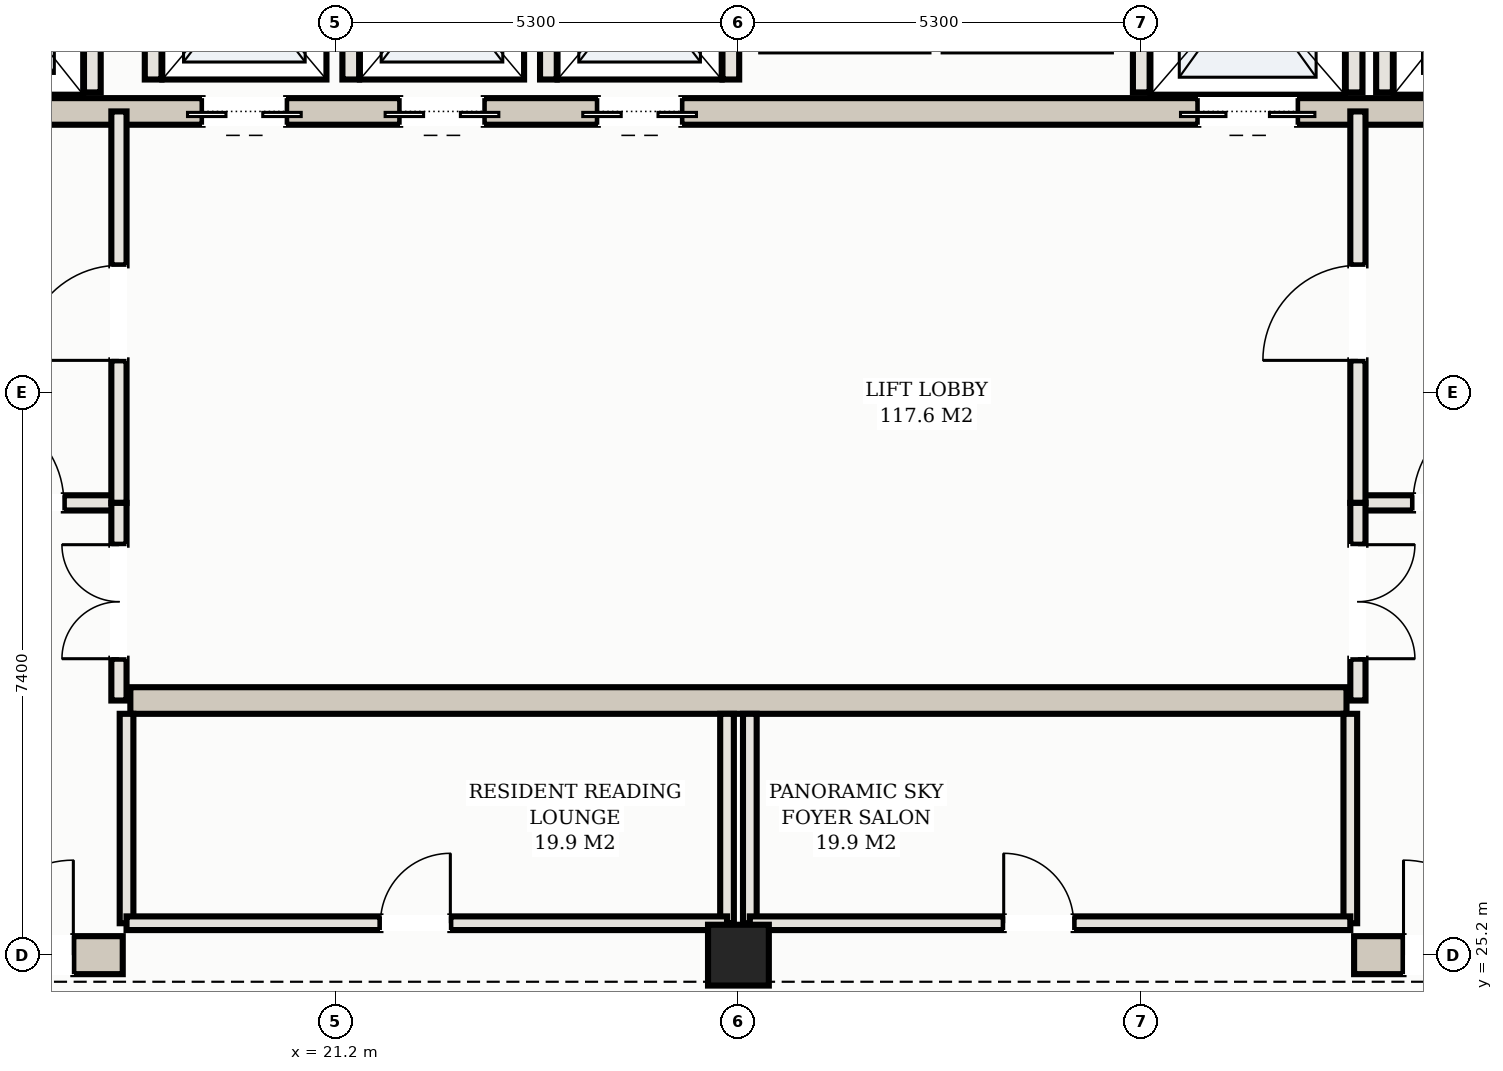
"""IFC4 building model, lengths in metres.
Left out: names, types, materials, properties, quantities, classifications, styles, units other than length and angle.
Written with IfcOpenShell. Run it as: python <this file> out.ifc"""

import sys

from ifc_helpers import new_model, si_unit, direction, frame, frame_2d, origin, origin_2d, place, context, subcontext, project, spatial, rectangle, hollow_rectangle, extrude, element, fill, save


model = new_model("IFC4")
c1 = context("Model", 3, precision=1e-05, world=origin(), true_north=direction((0.0, 1.0)))
c2 = subcontext(c1, "Body", "Model", "MODEL_VIEW")
j1 = project(units=[si_unit("LENGTHUNIT", "METRE"), si_unit("PLANEANGLEUNIT", "RADIAN")], contexts=[c1])
p1 = place(None, origin())
s1 = spatial("IfcSite", under=j1, at=p1, CompositionType="ELEMENT")
p2 = place(p1, origin())
s2 = spatial("IfcBuilding", under=s1, at=p2, CompositionType="ELEMENT")
p3 = place(p2, frame((0.0, 0.0, 206.6)))
s3 = spatial("IfcBuildingStorey", under=s2, at=p3, CompositionType="ELEMENT", Elevation=206.6)
p4 = place(p3, frame((10.35, 25.2, 0.0), z_axis=(0.0, 0.0, 1.0), x_axis=(1.0, 0.0, 0.0)))
e1 = element("IfcWall", 1, at=p4, inside=s3, PredefinedType="SHEAR", context=c2, shape_type="SweptSolid", body=[
    extrude(rectangle(XDim=8.05, YDim=0.5, at=frame_2d((4.025, 0.0))), origin(), (0.0, 0.0, 1.0), 3.11),
])
p5 = place(p4, frame((6.15, 0.0, 0.0)))
e2 = element("IfcOpeningElement", 2, at=p5, cuts=e1, PredefinedType="OPENING", context=c2, shape_type="SweptSolid", body=[
    extrude(rectangle(XDim=1.25, YDim=2.2, at=frame_2d((0.625, 1.1))), frame((0.0, 0.26, 0.0), z_axis=(0.0, -1.0, 0.0), x_axis=(1.0, 0.0, 0.0)), (0.0, 0.0, 1.0), 0.52),
])
p6 = place(p3, frame((34.6, 25.2, 0.0), z_axis=(0.0, 0.0, 1.0), x_axis=(1.0, 0.0, 0.0)))
e3 = element("IfcWall", 3, at=p6, inside=s3, PredefinedType="SHEAR", context=c2, shape_type="SweptSolid", body=[
    extrude(rectangle(XDim=8.05, YDim=0.5, at=frame_2d((4.025, 0.0))), origin(), (0.0, 0.0, 1.0), 3.11),
])
p7 = place(p6, frame((0.65, 0.0, 0.0)))
e4 = element("IfcOpeningElement", 4, at=p7, cuts=e3, PredefinedType="OPENING", context=c2, shape_type="SweptSolid", body=[
    extrude(rectangle(XDim=1.25, YDim=2.2, at=frame_2d((0.625, 1.1))), frame((0.0, 0.26, 0.0), z_axis=(0.0, -1.0, 0.0), x_axis=(1.0, 0.0, 0.0)), (0.0, 0.0, 1.0), 0.52),
])
p8 = place(p3, frame((15.5, 36.3, 0.0), z_axis=(0.0, 0.0, 1.0), x_axis=(1.0, 0.0, 0.0)))
e5 = element("IfcWall", 5, at=p8, inside=s3, PredefinedType="SHEAR", context=c2, shape_type="SweptSolid", body=[
    extrude(rectangle(XDim=22.0, YDim=0.35, at=frame_2d((11.0, 0.0))), origin(), (0.0, 0.0, 1.0), 3.11),
])
p9 = place(p8, frame((0.65, 0.0, 0.0)))
e6 = element("IfcOpeningElement", 6, at=p9, cuts=e5, PredefinedType="OPENING", context=c2, shape_type="SweptSolid", body=[
    extrude(rectangle(XDim=1.1, YDim=2.15, at=frame_2d((0.55, 1.075))), frame((0.0, 0.185, 0.0), z_axis=(0.0, -1.0, 0.0), x_axis=(1.0, 0.0, 0.0)), (0.0, 0.0, 1.0), 0.37),
])
p10 = place(p8, frame((20.25, 0.0, 0.0)))
e7 = element("IfcOpeningElement", 7, at=p10, cuts=e5, PredefinedType="OPENING", context=c2, shape_type="SweptSolid", body=[
    extrude(rectangle(XDim=1.1, YDim=2.15, at=frame_2d((0.55, 1.075))), frame((0.0, 0.185, 0.0), z_axis=(0.0, -1.0, 0.0), x_axis=(1.0, 0.0, 0.0)), (0.0, 0.0, 1.0), 0.37),
])
p11 = place(p8, frame((17.05, 0.0, 0.0)))
e8 = element("IfcOpeningElement", 8, at=p11, cuts=e5, PredefinedType="OPENING", context=c2, shape_type="SweptSolid", body=[
    extrude(rectangle(XDim=1.3, YDim=2.2, at=frame_2d((0.65, 1.1))), frame((0.0, 0.185, 0.0), z_axis=(0.0, -1.0, 0.0), x_axis=(1.0, 0.0, 0.0)), (0.0, 0.0, 1.0), 0.37),
])
p12 = place(p8, frame((3.95, 0.0, 0.0)))
e9 = element("IfcOpeningElement", 9, at=p12, cuts=e5, PredefinedType="OPENING", context=c2, shape_type="SweptSolid", body=[
    extrude(rectangle(XDim=1.1, YDim=2.15, at=frame_2d((0.55, 1.075))), frame((0.0, 0.185, 0.0), z_axis=(0.0, -1.0, 0.0), x_axis=(1.0, 0.0, 0.0)), (0.0, 0.0, 1.0), 0.37),
])
p13 = place(p8, frame((6.55, 0.0, 0.0)))
e10 = element("IfcOpeningElement", 10, at=p13, cuts=e5, PredefinedType="OPENING", context=c2, shape_type="SweptSolid", body=[
    extrude(rectangle(XDim=1.1, YDim=2.15, at=frame_2d((0.55, 1.075))), frame((0.0, 0.185, 0.0), z_axis=(0.0, -1.0, 0.0), x_axis=(1.0, 0.0, 0.0)), (0.0, 0.0, 1.0), 0.37),
])
p14 = place(p8, frame((9.15, 0.0, 0.0)))
e11 = element("IfcOpeningElement", 11, at=p14, cuts=e5, PredefinedType="OPENING", context=c2, shape_type="SweptSolid", body=[
    extrude(rectangle(XDim=1.1, YDim=2.15, at=frame_2d((0.55, 1.075))), frame((0.0, 0.185, 0.0), z_axis=(0.0, -1.0, 0.0), x_axis=(1.0, 0.0, 0.0)), (0.0, 0.0, 1.0), 0.37),
])
p15 = place(p3, frame((18.5, 28.55, 0.0), z_axis=(0.0, 0.0, 1.0), x_axis=(1.0, 0.0, 0.0)))
e12 = element("IfcWall", 12, at=p15, inside=s3, PredefinedType="SHEAR", context=c2, shape_type="SweptSolid", body=[
    extrude(rectangle(XDim=16.0, YDim=0.35, at=frame_2d((8.0, 0.0))), origin(), (0.0, 0.0, 1.0), 3.11),
])
p16 = place(p3, frame((26.5, 25.2, 0.0), z_axis=(0.0, 0.0, 1.0), x_axis=(1.0, 0.0, 0.0)))
e13 = element("IfcColumn", 13, at=p16, inside=s3, PredefinedType="COLUMN", context=c2, shape_type="SweptSolid", body=[
    extrude(hollow_rectangle(XDim=0.8, YDim=0.8, WallThickness=0.028, at=origin_2d()), origin(), (0.0, 0.0, 1.0), 3.3),
])
for number, where, z_axis, x_axis in (
    (14, (18.0, 36.55, 0.0), (0.0, 0.0, 1.0), (0.0, 1.0, 0.0)),
    (15, (35.0, 36.55, 0.0), (0.0, 0.0, 1.0), (0.0, 1.0, 0.0)),
    (16, (31.8, 36.55, 0.0), (0.0, 0.0, 1.0), (0.0, 1.0, 0.0)),
    (17, (34.6, 36.55, 0.0), (0.0, 0.0, 1.0), (0.0, 1.0, 0.0)),
):
    element("IfcWall", number, at=place(p3, frame(where, z_axis=z_axis, x_axis=x_axis)), inside=s3, PredefinedType="SOLIDWALL", context=c2, shape_type="SweptSolid", body=[
        extrude(rectangle(XDim=2.93, YDim=0.22, at=frame_2d((1.465, 0.0))), origin(), (0.0, 0.0, 1.0), 3.11),
    ])
for number, where, z_axis, x_axis in (
    (18, (18.8, 36.72, 0.0), (0.0, 0.0, 1.0), (0.0, 1.0, 0.0)),
    (19, (21.4, 36.72, 0.0), (0.0, 0.0, 1.0), (0.0, 1.0, 0.0)),
    (20, (24.0, 36.72, 0.0), (0.0, 0.0, 1.0), (0.0, 1.0, 0.0)),
    (21, (26.4, 36.72, 0.0), (0.0, 0.0, 1.0), (0.0, 1.0, 0.0)),
):
    element("IfcWall", number, at=place(p3, frame(where, z_axis=z_axis, x_axis=x_axis)), inside=s3, PredefinedType="SOLIDWALL", context=c2, shape_type="SweptSolid", body=[
        extrude(rectangle(XDim=2.56, YDim=0.22, at=frame_2d((1.28, 0.0))), origin(), (0.0, 0.0, 1.0), 3.11),
    ])
p17 = place(p3, frame((15.1, 31.15, 0.0), z_axis=(0.0, 0.0, 1.0), x_axis=(1.0, 0.0, 0.0)))
e22 = element("IfcWall", 22, at=p17, inside=s3, PredefinedType="PARTITIONING", context=c2, shape_type="SweptSolid", body=[
    extrude(rectangle(XDim=3.25, YDim=0.2, at=frame_2d((1.625, 0.0))), origin(), (0.0, 0.0, 1.0), 2.43),
])
p18 = place(p17, frame((1.275, 0.0, 0.0)))
e23 = element("IfcOpeningElement", 23, at=p18, cuts=e22, PredefinedType="OPENING", context=c2, shape_type="SweptSolid", body=[
    extrude(rectangle(XDim=1.25, YDim=2.2, at=frame_2d((0.625, 1.1))), frame((0.0, 0.11, 0.0), z_axis=(0.0, -1.0, 0.0), x_axis=(1.0, 0.0, 0.0)), (0.0, 0.0, 1.0), 0.22),
])
p19 = place(p3, frame((18.35, 31.15, 0.0), z_axis=(0.0, 0.0, 1.0), x_axis=(0.0, 1.0, 0.0)))
e24 = element("IfcWall", 24, at=p19, inside=s3, PredefinedType="PARTITIONING", context=c2, shape_type="SweptSolid", body=[
    extrude(rectangle(XDim=5.15, YDim=0.2, at=frame_2d((2.575, 0.0))), origin(), (0.0, 0.0, 1.0), 2.43),
])
p20 = place(p19, frame((1.875, 0.0, 0.0)))
e25 = element("IfcOpeningElement", 25, at=p20, cuts=e24, PredefinedType="OPENING", context=c2, shape_type="SweptSolid", body=[
    extrude(rectangle(XDim=1.25, YDim=2.2, at=frame_2d((0.625, 1.1))), frame((0.0, 0.11, 0.0), z_axis=(0.0, -1.0, 0.0), x_axis=(1.0, 0.0, 0.0)), (0.0, 0.0, 1.0), 0.22),
])
p21 = place(p3, frame((34.65, 31.15, 0.0), z_axis=(0.0, 0.0, 1.0), x_axis=(1.0, 0.0, 0.0)))
e26 = element("IfcWall", 26, at=p21, inside=s3, PredefinedType="PARTITIONING", context=c2, shape_type="SweptSolid", body=[
    extrude(rectangle(XDim=3.25, YDim=0.2, at=frame_2d((1.625, 0.0))), origin(), (0.0, 0.0, 1.0), 2.43),
])
p22 = place(p21, frame((0.725, 0.0, 0.0)))
e27 = element("IfcOpeningElement", 27, at=p22, cuts=e26, PredefinedType="OPENING", context=c2, shape_type="SweptSolid", body=[
    extrude(rectangle(XDim=1.25, YDim=2.2, at=frame_2d((0.625, 1.1))), frame((0.0, 0.11, 0.0), z_axis=(0.0, -1.0, 0.0), x_axis=(1.0, 0.0, 0.0)), (0.0, 0.0, 1.0), 0.22),
])
p23 = place(p3, frame((34.65, 31.15, 0.0), z_axis=(0.0, 0.0, 1.0), x_axis=(0.0, 1.0, 0.0)))
e28 = element("IfcWall", 28, at=p23, inside=s3, PredefinedType="PARTITIONING", context=c2, shape_type="SweptSolid", body=[
    extrude(rectangle(XDim=5.15, YDim=0.2, at=frame_2d((2.575, 0.0))), origin(), (0.0, 0.0, 1.0), 2.43),
])
p24 = place(p23, frame((1.875, 0.0, 0.0)))
e29 = element("IfcOpeningElement", 29, at=p24, cuts=e28, PredefinedType="OPENING", context=c2, shape_type="SweptSolid", body=[
    extrude(rectangle(XDim=1.25, YDim=2.2, at=frame_2d((0.625, 1.1))), frame((0.0, 0.11, 0.0), z_axis=(0.0, -1.0, 0.0), x_axis=(1.0, 0.0, 0.0)), (0.0, 0.0, 1.0), 0.22),
])
p25 = place(p3, frame((18.35, 28.55, 0.0), z_axis=(0.0, 0.0, 1.0), x_axis=(0.0, 1.0, 0.0)))
e30 = element("IfcWall", 30, at=p25, inside=s3, PredefinedType="PARTITIONING", context=c2, shape_type="SweptSolid", body=[
    extrude(rectangle(XDim=2.6, YDim=0.2, at=frame_2d((1.3, 0.0))), origin(), (0.0, 0.0, 1.0), 2.43),
])
p26 = place(p25, frame((0.55, 0.0, 0.0)))
e31 = element("IfcOpeningElement", 31, at=p26, cuts=e30, PredefinedType="OPENING", context=c2, shape_type="SweptSolid", body=[
    extrude(rectangle(XDim=1.5, YDim=2.25, at=frame_2d((0.75, 1.125))), frame((0.0, 0.11, 0.0), z_axis=(0.0, -1.0, 0.0), x_axis=(1.0, 0.0, 0.0)), (0.0, 0.0, 1.0), 0.22),
])
p27 = place(p3, frame((34.65, 28.55, 0.0), z_axis=(0.0, 0.0, 1.0), x_axis=(0.0, 1.0, 0.0)))
e32 = element("IfcWall", 32, at=p27, inside=s3, PredefinedType="PARTITIONING", context=c2, shape_type="SweptSolid", body=[
    extrude(rectangle(XDim=2.6, YDim=0.2, at=frame_2d((1.3, 0.0))), origin(), (0.0, 0.0, 1.0), 2.43),
])
p28 = place(p27, frame((0.55, 0.0, 0.0)))
e33 = element("IfcOpeningElement", 33, at=p28, cuts=e32, PredefinedType="OPENING", context=c2, shape_type="SweptSolid", body=[
    extrude(rectangle(XDim=1.5, YDim=2.25, at=frame_2d((0.75, 1.125))), frame((0.0, 0.11, 0.0), z_axis=(0.0, -1.0, 0.0), x_axis=(1.0, 0.0, 0.0)), (0.0, 0.0, 1.0), 0.22),
])
for number, where, z_axis, x_axis in (
    (34, (18.45, 25.62, 0.0), (0.0, 0.0, 1.0), (0.0, 1.0, 0.0)),
    (35, (26.35, 25.62, 0.0), (0.0, 0.0, 1.0), (0.0, 1.0, 0.0)),
):
    element("IfcWall", number, at=place(p3, frame(where, z_axis=z_axis, x_axis=x_axis)), inside=s3, PredefinedType="PARTITIONING", context=c2, shape_type="SweptSolid", body=[
        extrude(rectangle(XDim=2.755, YDim=0.18, at=frame_2d((1.377, 0.0))), origin(), (0.0, 0.0, 1.0), 2.43),
    ])
p29 = place(p3, frame((18.45, 25.62, 0.0), z_axis=(0.0, 0.0, 1.0), x_axis=(1.0, 0.0, 0.0)))
e36 = element("IfcWall", 36, at=p29, inside=s3, PredefinedType="PARTITIONING", context=c2, shape_type="SweptSolid", body=[
    extrude(rectangle(XDim=7.9, YDim=0.18, at=frame_2d((3.95, 0.0))), origin(), (0.0, 0.0, 1.0), 2.43),
])
p30 = place(p29, frame((3.34, 0.0, 0.0)))
e37 = element("IfcOpeningElement", 37, at=p30, cuts=e36, PredefinedType="OPENING", context=c2, shape_type="SweptSolid", body=[
    extrude(rectangle(XDim=0.92, YDim=2.15, at=frame_2d((0.46, 1.075))), frame((0.0, 0.1, 0.0), z_axis=(0.0, -1.0, 0.0), x_axis=(1.0, 0.0, 0.0)), (0.0, 0.0, 1.0), 0.2),
])
for number, where, z_axis, x_axis in (
    (38, (26.65, 25.62, 0.0), (0.0, 0.0, 1.0), (0.0, 1.0, 0.0)),
    (39, (34.55, 25.62, 0.0), (0.0, 0.0, 1.0), (0.0, 1.0, 0.0)),
):
    element("IfcWall", number, at=place(p3, frame(where, z_axis=z_axis, x_axis=x_axis)), inside=s3, PredefinedType="PARTITIONING", context=c2, shape_type="SweptSolid", body=[
        extrude(rectangle(XDim=2.755, YDim=0.18, at=frame_2d((1.377, 0.0))), origin(), (0.0, 0.0, 1.0), 2.43),
    ])
p31 = place(p3, frame((26.65, 25.62, 0.0), z_axis=(0.0, 0.0, 1.0), x_axis=(1.0, 0.0, 0.0)))
e40 = element("IfcWall", 40, at=p31, inside=s3, PredefinedType="PARTITIONING", context=c2, shape_type="SweptSolid", body=[
    extrude(rectangle(XDim=7.9, YDim=0.18, at=frame_2d((3.95, 0.0))), origin(), (0.0, 0.0, 1.0), 2.43),
])
p32 = place(p31, frame((3.34, 0.0, 0.0)))
e41 = element("IfcOpeningElement", 41, at=p32, cuts=e40, PredefinedType="OPENING", context=c2, shape_type="SweptSolid", body=[
    extrude(rectangle(XDim=0.92, YDim=2.15, at=frame_2d((0.46, 1.075))), frame((0.0, 0.1, 0.0), z_axis=(0.0, -1.0, 0.0), x_axis=(1.0, 0.0, 0.0)), (0.0, 0.0, 1.0), 0.2),
])
p33 = place(p11, frame((1.3, 0.0, 0.0), z_axis=(0.0, 0.0, 1.0), x_axis=(-1.0, 0.0, 0.0)))
e42 = element("IfcDoor", 42, at=p33, inside=s3, OperationType="DOUBLE_DOOR_SLIDING", PredefinedType="DOOR", context=c2, shape_type="SweptSolid", body=[
    extrude(rectangle(XDim=1.3, YDim=2.2, at=frame_2d((0.65, 1.1))), frame((0.0, 0.025, 0.0), z_axis=(0.0, -1.0, 0.0), x_axis=(1.0, 0.0, 0.0)), (0.0, 0.0, 1.0), 0.05),
])
fill(e8, e42)
p34 = place(p12, frame((1.1, 0.0, 0.0), z_axis=(0.0, 0.0, 1.0), x_axis=(-1.0, 0.0, 0.0)))
e43 = element("IfcDoor", 43, at=p34, inside=s3, OperationType="DOUBLE_DOOR_SLIDING", PredefinedType="DOOR", context=c2, shape_type="SweptSolid", body=[
    extrude(rectangle(XDim=1.1, YDim=2.15, at=frame_2d((0.55, 1.075))), frame((0.0, 0.025, 0.0), z_axis=(0.0, -1.0, 0.0), x_axis=(1.0, 0.0, 0.0)), (0.0, 0.0, 1.0), 0.05),
])
fill(e9, e43)
p35 = place(p13, frame((1.1, 0.0, 0.0), z_axis=(0.0, 0.0, 1.0), x_axis=(-1.0, 0.0, 0.0)))
e44 = element("IfcDoor", 44, at=p35, inside=s3, OperationType="DOUBLE_DOOR_SLIDING", PredefinedType="DOOR", context=c2, shape_type="SweptSolid", body=[
    extrude(rectangle(XDim=1.1, YDim=2.15, at=frame_2d((0.55, 1.075))), frame((0.0, 0.025, 0.0), z_axis=(0.0, -1.0, 0.0), x_axis=(1.0, 0.0, 0.0)), (0.0, 0.0, 1.0), 0.05),
])
fill(e10, e44)
p36 = place(p14, frame((1.1, 0.0, 0.0), z_axis=(0.0, 0.0, 1.0), x_axis=(-1.0, 0.0, 0.0)))
e45 = element("IfcDoor", 45, at=p36, inside=s3, OperationType="DOUBLE_DOOR_SLIDING", PredefinedType="DOOR", context=c2, shape_type="SweptSolid", body=[
    extrude(rectangle(XDim=1.1, YDim=2.15, at=frame_2d((0.55, 1.075))), frame((0.0, 0.025, 0.0), z_axis=(0.0, -1.0, 0.0), x_axis=(1.0, 0.0, 0.0)), (0.0, 0.0, 1.0), 0.05),
])
fill(e11, e45)
p37 = place(p5, origin())
e46 = element("IfcDoor", 46, at=p37, inside=s3, OperationType="SINGLE_SWING_RIGHT", PredefinedType="DOOR", context=c2, shape_type="SweptSolid", body=[
    extrude(rectangle(XDim=1.25, YDim=2.2, at=frame_2d((0.625, 1.1))), frame((0.0, 0.025, 0.0), z_axis=(0.0, -1.0, 0.0), x_axis=(1.0, 0.0, 0.0)), (0.0, 0.0, 1.0), 0.05),
])
fill(e2, e46)
p38 = place(p7, origin())
e47 = element("IfcDoor", 47, at=p38, inside=s3, OperationType="SINGLE_SWING_LEFT", PredefinedType="DOOR", context=c2, shape_type="SweptSolid", body=[
    extrude(rectangle(XDim=1.25, YDim=2.2, at=frame_2d((0.625, 1.1))), frame((0.0, 0.025, 0.0), z_axis=(0.0, -1.0, 0.0), x_axis=(1.0, 0.0, 0.0)), (0.0, 0.0, 1.0), 0.05),
])
fill(e4, e47)
p39 = place(p18, origin())
e48 = element("IfcDoor", 48, at=p39, inside=s3, OperationType="SINGLE_SWING_LEFT", PredefinedType="DOOR", context=c2, shape_type="SweptSolid", body=[
    extrude(rectangle(XDim=1.25, YDim=2.2, at=frame_2d((0.625, 1.1))), frame((0.0, 0.025, 0.0), z_axis=(0.0, -1.0, 0.0), x_axis=(1.0, 0.0, 0.0)), (0.0, 0.0, 1.0), 0.05),
])
fill(e23, e48)
p40 = place(p20, origin())
e49 = element("IfcDoor", 49, at=p40, inside=s3, OperationType="SINGLE_SWING_LEFT", PredefinedType="DOOR", context=c2, shape_type="SweptSolid", body=[
    extrude(rectangle(XDim=1.25, YDim=2.2, at=frame_2d((0.625, 1.1))), frame((0.0, 0.025, 0.0), z_axis=(0.0, -1.0, 0.0), x_axis=(1.0, 0.0, 0.0)), (0.0, 0.0, 1.0), 0.05),
])
fill(e25, e49)
p41 = place(p22, origin())
e50 = element("IfcDoor", 50, at=p41, inside=s3, OperationType="SINGLE_SWING_RIGHT", PredefinedType="DOOR", context=c2, shape_type="SweptSolid", body=[
    extrude(rectangle(XDim=1.25, YDim=2.2, at=frame_2d((0.625, 1.1))), frame((0.0, 0.025, 0.0), z_axis=(0.0, -1.0, 0.0), x_axis=(1.0, 0.0, 0.0)), (0.0, 0.0, 1.0), 0.05),
])
fill(e27, e50)
p42 = place(p24, origin())
e51 = element("IfcDoor", 51, at=p42, inside=s3, OperationType="SINGLE_SWING_LEFT", PredefinedType="DOOR", context=c2, shape_type="SweptSolid", body=[
    extrude(rectangle(XDim=1.25, YDim=2.2, at=frame_2d((0.625, 1.1))), frame((0.0, 0.025, 0.0), z_axis=(0.0, -1.0, 0.0), x_axis=(1.0, 0.0, 0.0)), (0.0, 0.0, 1.0), 0.05),
])
fill(e29, e51)
p43 = place(p26, origin())
e52 = element("IfcDoor", 52, at=p43, inside=s3, OperationType="DOUBLE_DOOR_SINGLE_SWING", PredefinedType="DOOR", context=c2, shape_type="SweptSolid", body=[
    extrude(rectangle(XDim=1.5, YDim=2.25, at=frame_2d((0.75, 1.125))), frame((0.0, 0.025, 0.0), z_axis=(0.0, -1.0, 0.0), x_axis=(1.0, 0.0, 0.0)), (0.0, 0.0, 1.0), 0.05),
])
fill(e31, e52)
p44 = place(p28, frame((1.5, 0.0, 0.0), z_axis=(0.0, 0.0, 1.0), x_axis=(-1.0, 0.0, 0.0)))
e53 = element("IfcDoor", 53, at=p44, inside=s3, OperationType="DOUBLE_DOOR_SINGLE_SWING", PredefinedType="DOOR", context=c2, shape_type="SweptSolid", body=[
    extrude(rectangle(XDim=1.5, YDim=2.25, at=frame_2d((0.75, 1.125))), frame((0.0, 0.025, 0.0), z_axis=(0.0, -1.0, 0.0), x_axis=(1.0, 0.0, 0.0)), (0.0, 0.0, 1.0), 0.05),
])
fill(e33, e53)
p45 = place(p30, origin())
e54 = element("IfcDoor", 54, at=p45, inside=s3, OperationType="SINGLE_SWING_RIGHT", PredefinedType="DOOR", context=c2, shape_type="SweptSolid", body=[
    extrude(rectangle(XDim=0.92, YDim=2.15, at=frame_2d((0.46, 1.075))), frame((0.0, 0.025, 0.0), z_axis=(0.0, -1.0, 0.0), x_axis=(1.0, 0.0, 0.0)), (0.0, 0.0, 1.0), 0.05),
])
fill(e37, e54)
p46 = place(p32, origin())
e55 = element("IfcDoor", 55, at=p46, inside=s3, OperationType="SINGLE_SWING_LEFT", PredefinedType="DOOR", context=c2, shape_type="SweptSolid", body=[
    extrude(rectangle(XDim=0.92, YDim=2.15, at=frame_2d((0.46, 1.075))), frame((0.0, 0.025, 0.0), z_axis=(0.0, -1.0, 0.0), x_axis=(1.0, 0.0, 0.0)), (0.0, 0.0, 1.0), 0.05),
])
fill(e41, e55)
save(model, sys.argv[1])
